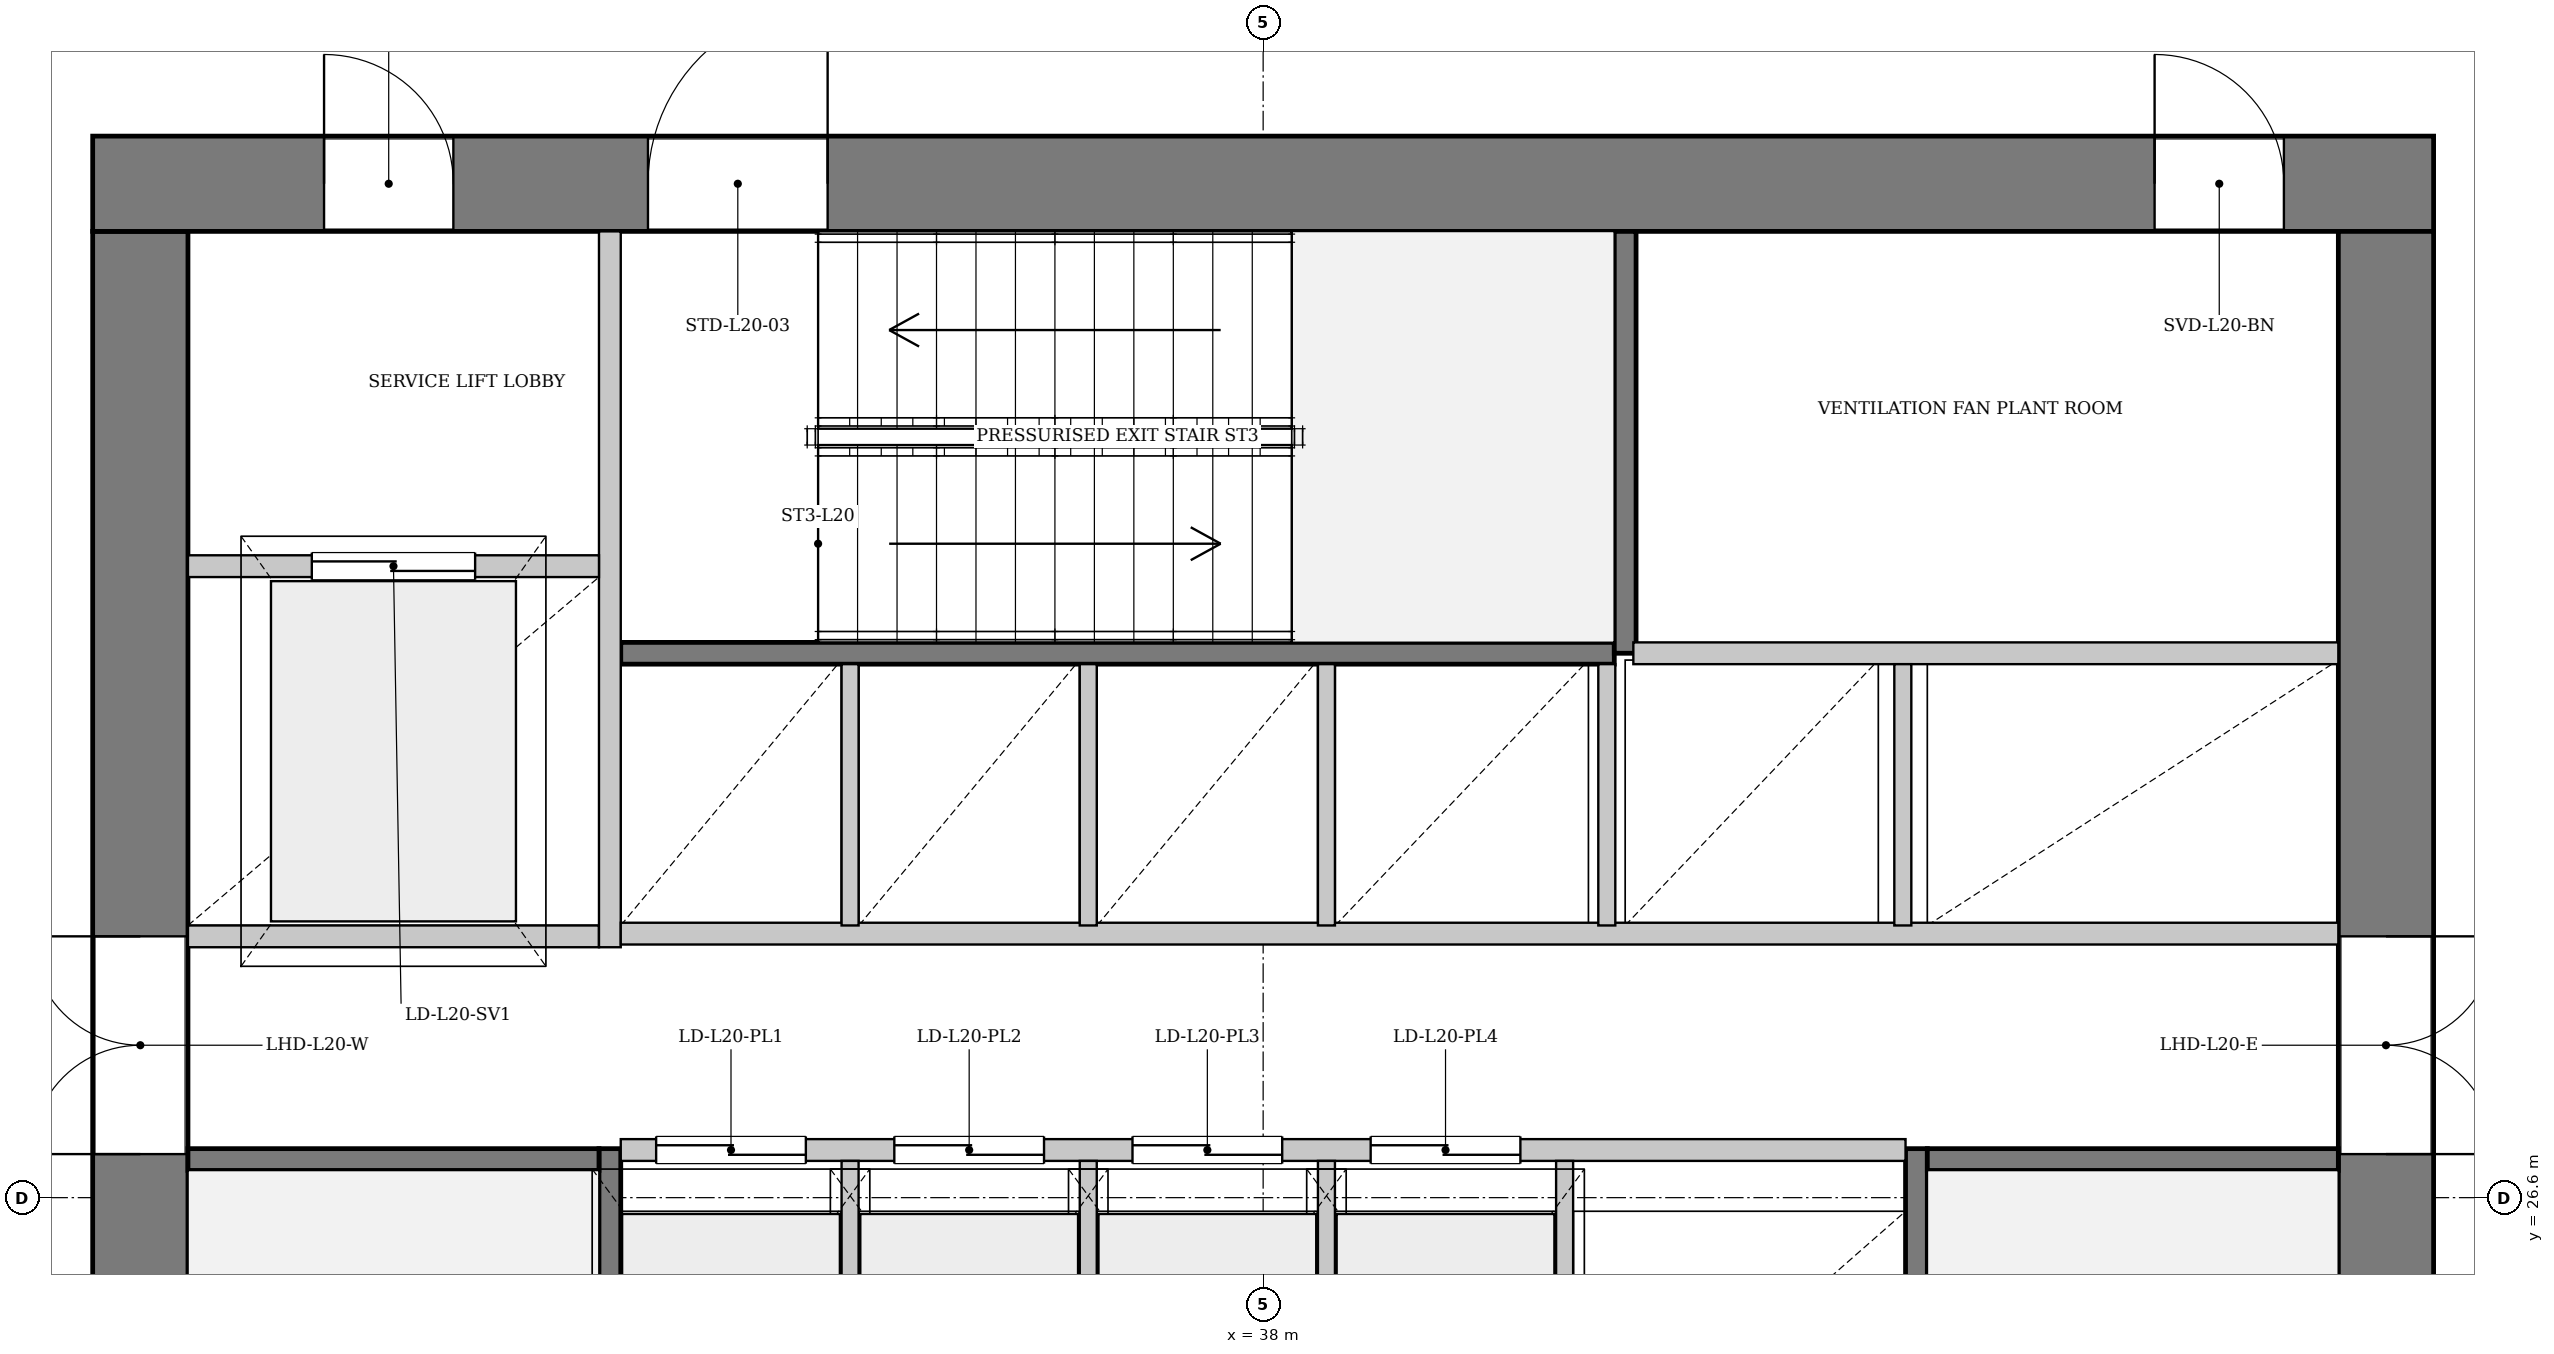
"""IFC4 building model, lengths in metres.
Left out: names, types, materials, properties, quantities, classifications, styles, units other than length and angle.
Written with IfcOpenShell. Run it as: python <this file> out.ifc"""

import sys

from ifc_helpers import new_model, si_unit, direction, frame, frame_2d, origin, place, context, subcontext, project, spatial, rectangle, extrude, source, transform, mapped, element, fill, save


model = new_model("IFC4")
c1 = context("Model", 3, precision=1e-05, world=origin(), true_north=direction((0.0, 1.0)))
c2 = subcontext(c1, "Body", "Model", "MODEL_VIEW")
j1 = project(units=[si_unit("LENGTHUNIT", "METRE"), si_unit("PLANEANGLEUNIT", "RADIAN")], contexts=[c1])
p1 = place(None, origin())
s1 = spatial("IfcSite", under=j1, at=p1, CompositionType="ELEMENT")
p2 = place(p1, origin())
s2 = spatial("IfcBuilding", under=s1, at=p2, CompositionType="ELEMENT")
p3 = place(p2, frame((0.0, 0.0, 79.9)))
s3 = spatial("IfcBuildingStorey", under=s2, at=p3, CompositionType="ELEMENT", Elevation=79.9)
p4 = place(p3, frame((45.57, 43.679, 0.0), z_axis=(0.0, 0.0, 1.0), x_axis=(0.920635630861, -0.390422892758, 0.0)))
e1 = element("IfcWall", 1, at=p4, inside=s3, PredefinedType="SOLIDWALL", context=c2, shape_type="SweptSolid", body=[
    extrude(rectangle(XDim=23.607, YDim=0.38, at=frame_2d((11.804, 0.0))), origin(), (0.0, 0.0, 1.0), 3.642),
])
p5 = place(p3, frame((29.75, 19.5, 0.0), z_axis=(0.0, 0.0, 1.0), x_axis=(0.0, 1.0, 0.0)))
e2 = element("IfcWall", 2, at=p5, inside=s3, PredefinedType="SHEAR", context=c2, shape_type="SweptSolid", body=[
    extrude(rectangle(XDim=14.2, YDim=0.7, at=frame_2d((7.1, 0.0))), origin(), (0.0, 0.0, 1.0), 4.25),
])
p6 = place(p5, frame((7.42, 0.0, 0.0)))
e3 = element("IfcOpeningElement", 3, at=p6, cuts=e2, PredefinedType="OPENING", context=c2, shape_type="SweptSolid", body=[
    extrude(rectangle(XDim=1.6, YDim=2.2, at=frame_2d((0.8, 1.1))), frame((0.0, 0.36, 0.0), z_axis=(0.0, -1.0, 0.0), x_axis=(1.0, 0.0, 0.0)), (0.0, 0.0, 1.0), 0.72),
])
p7 = place(p3, frame((29.4, 34.05, 0.0), z_axis=(0.0, 0.0, 1.0), x_axis=(1.0, 0.0, 0.0)))
e4 = element("IfcWall", 4, at=p7, inside=s3, PredefinedType="SHEAR", context=c2, shape_type="SweptSolid", body=[
    extrude(rectangle(XDim=17.2, YDim=0.7, at=frame_2d((8.6, 0.0))), origin(), (0.0, 0.0, 1.0), 4.25),
])
p8 = place(p7, frame((1.7, 0.0, 0.0)))
e5 = element("IfcOpeningElement", 5, at=p8, cuts=e4, PredefinedType="OPENING", context=c2, shape_type="SweptSolid", body=[
    extrude(rectangle(XDim=0.95, YDim=2.1, at=frame_2d((0.475, 1.05))), frame((0.0, 0.36, 0.0), z_axis=(0.0, -1.0, 0.0), x_axis=(1.0, 0.0, 0.0)), (0.0, 0.0, 1.0), 0.72),
])
p9 = place(p7, frame((4.08, 0.0, 0.0)))
e6 = element("IfcOpeningElement", 6, at=p9, cuts=e4, PredefinedType="OPENING", context=c2, shape_type="SweptSolid", body=[
    extrude(rectangle(XDim=1.32, YDim=2.2, at=frame_2d((0.66, 1.1))), frame((0.0, 0.36, 0.0), z_axis=(0.0, -1.0, 0.0), x_axis=(1.0, 0.0, 0.0)), (0.0, 0.0, 1.0), 0.72),
])
p10 = place(p7, frame((15.15, 0.0, 0.0)))
e7 = element("IfcOpeningElement", 7, at=p10, cuts=e4, PredefinedType="OPENING", context=c2, shape_type="SweptSolid", body=[
    extrude(rectangle(XDim=0.95, YDim=2.1, at=frame_2d((0.475, 1.05))), frame((0.0, 0.36, 0.0), z_axis=(0.0, -1.0, 0.0), x_axis=(1.0, 0.0, 0.0)), (0.0, 0.0, 1.0), 0.72),
])
p11 = place(p3, frame((46.25, 33.7, 0.0), z_axis=(0.0, 0.0, 1.0), x_axis=(0.0, -1.0, 0.0)))
e8 = element("IfcWall", 8, at=p11, inside=s3, PredefinedType="SHEAR", context=c2, shape_type="SweptSolid", body=[
    extrude(rectangle(XDim=14.2, YDim=0.7, at=frame_2d((7.1, 0.0))), origin(), (0.0, 0.0, 1.0), 4.25),
])
p12 = place(p11, frame((5.18, 0.0, 0.0)))
e9 = element("IfcOpeningElement", 9, at=p12, cuts=e8, PredefinedType="OPENING", context=c2, shape_type="SweptSolid", body=[
    extrude(rectangle(XDim=1.6, YDim=2.2, at=frame_2d((0.8, 1.1))), frame((0.0, 0.36, 0.0), z_axis=(0.0, -1.0, 0.0), x_axis=(1.0, 0.0, 0.0)), (0.0, 0.0, 1.0), 0.72),
])
p13 = place(p3, frame((33.2, 19.5, 0.0), z_axis=(0.0, 0.0, 1.0), x_axis=(0.0, 1.0, 0.0)))
e10 = element("IfcWall", 10, at=p13, inside=s3, PredefinedType="PARTITIONING", context=c2, shape_type="SweptSolid", body=[
    extrude(rectangle(XDim=7.46, YDim=0.16, at=frame_2d((3.73, 0.0))), origin(), (0.0, 0.0, 1.0), 4.25),
])
p14 = place(p13, frame((0.08, 0.0, 0.0)))
e11 = element("IfcOpeningElement", 11, at=p14, cuts=e10, PredefinedType="OPENING", context=c2, shape_type="SweptSolid", body=[
    extrude(rectangle(XDim=1.32, YDim=2.2, at=frame_2d((0.66, 1.1))), frame((0.0, 0.09, 0.0), z_axis=(0.0, -1.0, 0.0), x_axis=(1.0, 0.0, 0.0)), (0.0, 0.0, 1.0), 0.18),
])
p15 = place(p3, frame((30.1, 26.88, 0.0), z_axis=(0.0, 0.0, 1.0), x_axis=(1.0, 0.0, 0.0)))
e12 = element("IfcWall", 12, at=p15, inside=s3, PredefinedType="PARTITIONING", context=c2, shape_type="SweptSolid", body=[
    extrude(rectangle(XDim=3.02, YDim=0.16, at=frame_2d((1.51, 0.0))), origin(), (0.0, 0.0, 1.0), 4.25),
])
p16 = place(p3, frame((42.8, 26.96, 0.0), z_axis=(0.0, 0.0, 1.0), x_axis=(0.0, -1.0, 0.0)))
e13 = element("IfcWall", 13, at=p16, inside=s3, PredefinedType="PARTITIONING", context=c2, shape_type="SweptSolid", body=[
    extrude(rectangle(XDim=7.46, YDim=0.16, at=frame_2d((3.73, 0.0))), origin(), (0.0, 0.0, 1.0), 4.25),
])
p17 = place(p16, frame((6.06, 0.0, 0.0)))
e14 = element("IfcOpeningElement", 14, at=p17, cuts=e13, PredefinedType="OPENING", context=c2, shape_type="SweptSolid", body=[
    extrude(rectangle(XDim=1.32, YDim=2.2, at=frame_2d((0.66, 1.1))), frame((0.0, 0.09, 0.0), z_axis=(0.0, -1.0, 0.0), x_axis=(1.0, 0.0, 0.0)), (0.0, 0.0, 1.0), 0.18),
])
p18 = place(p3, frame((42.88, 26.88, 0.0), z_axis=(0.0, 0.0, 1.0), x_axis=(1.0, 0.0, 0.0)))
e15 = element("IfcWall", 15, at=p18, inside=s3, PredefinedType="PARTITIONING", context=c2, shape_type="SweptSolid", body=[
    extrude(rectangle(XDim=3.02, YDim=0.16, at=frame_2d((1.51, 0.0))), origin(), (0.0, 0.0, 1.0), 4.25),
])
p19 = place(p3, frame((33.28, 30.6, 0.0), z_axis=(0.0, 0.0, 1.0), x_axis=(1.0, 0.0, 0.0)))
e16 = element("IfcWall", 16, at=p19, inside=s3, PredefinedType="PARTITIONING", context=c2, shape_type="SweptSolid", body=[
    extrude(rectangle(XDim=7.3, YDim=0.16, at=frame_2d((3.65, 0.0))), origin(), (0.0, 0.0, 1.0), 4.25),
])
p20 = place(p3, frame((40.66, 30.6, 0.0), z_axis=(0.0, 0.0, 1.0), x_axis=(0.0, 1.0, 0.0)))
e17 = element("IfcWall", 17, at=p20, inside=s3, PredefinedType="PARTITIONING", context=c2, shape_type="SweptSolid", body=[
    extrude(rectangle(XDim=3.1, YDim=0.16, at=frame_2d((1.55, 0.0))), origin(), (0.0, 0.0, 1.0), 4.25),
])
p21 = place(p3, frame((30.1, 28.52, 0.0), z_axis=(0.0, 0.0, 1.0), x_axis=(1.0, 0.0, 0.0)))
e18 = element("IfcWall", 18, at=p21, inside=s3, PredefinedType="PARTITIONING", context=c2, shape_type="SweptSolid", body=[
    extrude(rectangle(XDim=3.02, YDim=0.16, at=frame_2d((1.51, 0.0))), origin(), (0.0, 0.0, 1.0), 4.25),
])
p22 = place(p3, frame((33.2, 28.44, 0.0), z_axis=(0.0, 0.0, 1.0), x_axis=(0.0, 1.0, 0.0)))
e19 = element("IfcWall", 19, at=p22, inside=s3, PredefinedType="PARTITIONING", context=c2, shape_type="SweptSolid", body=[
    extrude(rectangle(XDim=5.26, YDim=0.16, at=frame_2d((2.63, 0.0))), origin(), (0.0, 0.0, 1.0), 4.25),
])
p23 = place(p3, frame((30.1, 31.24, 0.0), z_axis=(0.0, 0.0, 1.0), x_axis=(1.0, 0.0, 0.0)))
e20 = element("IfcWall", 20, at=p23, inside=s3, PredefinedType="PARTITIONING", context=c2, shape_type="SweptSolid", body=[
    extrude(rectangle(XDim=3.02, YDim=0.16, at=frame_2d((1.51, 0.0))), origin(), (0.0, 0.0, 1.0), 4.25),
])
p24 = place(p23, frame((0.91, 0.0, 0.0)))
e21 = element("IfcOpeningElement", 21, at=p24, cuts=e20, PredefinedType="OPENING", context=c2, shape_type="SweptSolid", body=[
    extrude(rectangle(XDim=1.2, YDim=2.2, at=frame_2d((0.6, 1.1))), frame((0.0, 0.09, 0.0), z_axis=(0.0, -1.0, 0.0), x_axis=(1.0, 0.0, 0.0)), (0.0, 0.0, 1.0), 0.18),
])
p25 = place(p3, frame((33.28, 26.95, 0.0), z_axis=(0.0, 0.0, 1.0), x_axis=(1.0, 0.0, 0.0)))
e22 = element("IfcWall", 22, at=p25, inside=s3, PredefinedType="PARTITIONING", context=c2, shape_type="SweptSolid", body=[
    extrude(rectangle(XDim=9.44, YDim=0.16, at=frame_2d((4.72, 0.0))), origin(), (0.0, 0.0, 1.0), 4.25),
])
p26 = place(p25, frame((0.26, 0.0, 0.0)))
e23 = element("IfcOpeningElement", 23, at=p26, cuts=e22, PredefinedType="OPENING", context=c2, shape_type="SweptSolid", body=[
    extrude(rectangle(XDim=1.1, YDim=2.2, at=frame_2d((0.55, 1.1))), frame((0.0, 0.09, 0.0), z_axis=(0.0, -1.0, 0.0), x_axis=(1.0, 0.0, 0.0)), (0.0, 0.0, 1.0), 0.18),
])
p27 = place(p25, frame((2.01, 0.0, 0.0)))
e24 = element("IfcOpeningElement", 24, at=p27, cuts=e22, PredefinedType="OPENING", context=c2, shape_type="SweptSolid", body=[
    extrude(rectangle(XDim=1.1, YDim=2.2, at=frame_2d((0.55, 1.1))), frame((0.0, 0.09, 0.0), z_axis=(0.0, -1.0, 0.0), x_axis=(1.0, 0.0, 0.0)), (0.0, 0.0, 1.0), 0.18),
])
p28 = place(p25, frame((3.76, 0.0, 0.0)))
e25 = element("IfcOpeningElement", 25, at=p28, cuts=e22, PredefinedType="OPENING", context=c2, shape_type="SweptSolid", body=[
    extrude(rectangle(XDim=1.1, YDim=2.2, at=frame_2d((0.55, 1.1))), frame((0.0, 0.09, 0.0), z_axis=(0.0, -1.0, 0.0), x_axis=(1.0, 0.0, 0.0)), (0.0, 0.0, 1.0), 0.18),
])
p29 = place(p25, frame((5.51, 0.0, 0.0)))
e26 = element("IfcOpeningElement", 26, at=p29, cuts=e22, PredefinedType="OPENING", context=c2, shape_type="SweptSolid", body=[
    extrude(rectangle(XDim=1.1, YDim=2.2, at=frame_2d((0.55, 1.1))), frame((0.0, 0.09, 0.0), z_axis=(0.0, -1.0, 0.0), x_axis=(1.0, 0.0, 0.0)), (0.0, 0.0, 1.0), 0.18),
])
for number, where, z_axis, x_axis in (
    (27, (34.965, 24.56, 0.0), (0.0, 0.0, 1.0), (0.0, 1.0, 0.0)),
    (28, (36.715, 24.56, 0.0), (0.0, 0.0, 1.0), (0.0, 1.0, 0.0)),
    (29, (38.465, 24.56, 0.0), (0.0, 0.0, 1.0), (0.0, 1.0, 0.0)),
    (30, (40.215, 24.56, 0.0), (0.0, 0.0, 1.0), (0.0, 1.0, 0.0)),
):
    element("IfcWall", number, at=place(p3, frame(where, z_axis=z_axis, x_axis=x_axis)), inside=s3, PredefinedType="PARTITIONING", context=c2, shape_type="SweptSolid", body=[
        extrude(rectangle(XDim=2.31, YDim=0.125, at=frame_2d((1.155, 0.0))), origin(), (0.0, 0.0, 1.0), 4.25),
    ])
p30 = place(p3, frame((33.28, 28.54, 0.0), z_axis=(0.0, 0.0, 1.0), x_axis=(1.0, 0.0, 0.0)))
e31 = element("IfcWall", 31, at=p30, inside=s3, PredefinedType="PARTITIONING", context=c2, shape_type="SweptSolid", body=[
    extrude(rectangle(XDim=12.62, YDim=0.16, at=frame_2d((6.31, 0.0))), origin(), (0.0, 0.0, 1.0), 4.25),
])
p31 = place(p3, frame((40.72, 30.6, 0.0), z_axis=(0.0, 0.0, 1.0), x_axis=(1.0, 0.0, 0.0)))
e32 = element("IfcWall", 32, at=p31, inside=s3, PredefinedType="PARTITIONING", context=c2, shape_type="SweptSolid", body=[
    extrude(rectangle(XDim=5.18, YDim=0.16, at=frame_2d((2.59, 0.0))), origin(), (0.0, 0.0, 1.0), 4.25),
])
for number, where, z_axis, x_axis in (
    (33, (34.965, 28.6, 0.0), (0.0, 0.0, 1.0), (0.0, 1.0, 0.0)),
    (34, (36.715, 28.6, 0.0), (0.0, 0.0, 1.0), (0.0, 1.0, 0.0)),
    (35, (38.465, 28.6, 0.0), (0.0, 0.0, 1.0), (0.0, 1.0, 0.0)),
    (36, (40.525, 28.6, 0.0), (0.0, 0.0, 1.0), (0.0, 1.0, 0.0)),
    (37, (42.7, 28.6, 0.0), (0.0, 0.0, 1.0), (0.0, 1.0, 0.0)),
):
    element("IfcWall", number, at=place(p3, frame(where, z_axis=z_axis, x_axis=x_axis)), inside=s3, PredefinedType="PARTITIONING", context=c2, shape_type="SweptSolid", body=[
        extrude(rectangle(XDim=1.92, YDim=0.125, at=frame_2d((0.96, 0.0))), origin(), (0.0, 0.0, 1.0), 4.25),
    ])
m1 = source(origin(), c2, "Body", "SweptSolid", [
    extrude(rectangle(XDim=1.6, YDim=2.2, at=frame_2d((0.8, 1.1))), frame((0.0, 0.025, 0.0), z_axis=(0.0, -1.0, 0.0), x_axis=(1.0, 0.0, 0.0)), (0.0, 0.0, 1.0), 0.05),
])
p32 = place(p6, origin())
e38 = element("IfcDoor", 38, at=p32, inside=s3, OperationType="DOUBLE_DOOR_SINGLE_SWING", PredefinedType="DOOR", context=c2, shape_type="MappedRepresentation", body=[
    mapped(m1, transform((0.0, 0.0, 0.0), x_axis=(1.0, 0.0, 0.0), y_axis=(0.0, 1.0, 0.0), z_axis=(0.0, 0.0, 1.0), scale=1.0)),
])
fill(e3, e38)
m2 = source(origin(), c2, "Body", "SweptSolid", [
    extrude(rectangle(XDim=0.95, YDim=2.1, at=frame_2d((0.475, 1.05))), frame((0.0, 0.025, 0.0), z_axis=(0.0, -1.0, 0.0), x_axis=(1.0, 0.0, 0.0)), (0.0, 0.0, 1.0), 0.05),
])
p33 = place(p8, origin())
e39 = element("IfcDoor", 39, at=p33, inside=s3, OperationType="SINGLE_SWING_LEFT", PredefinedType="DOOR", context=c2, shape_type="MappedRepresentation", body=[
    mapped(m2, transform((0.0, 0.0, 0.0), x_axis=(1.0, 0.0, 0.0), y_axis=(0.0, 1.0, 0.0), z_axis=(0.0, 0.0, 1.0), scale=1.0)),
])
fill(e5, e39)
m3 = source(origin(), c2, "Body", "SweptSolid", [
    extrude(rectangle(XDim=1.32, YDim=2.2, at=frame_2d((0.66, 1.1))), frame((0.0, 0.025, 0.0), z_axis=(0.0, -1.0, 0.0), x_axis=(1.0, 0.0, 0.0)), (0.0, 0.0, 1.0), 0.05),
])
p34 = place(p9, origin())
e40 = element("IfcDoor", 40, at=p34, inside=s3, OperationType="SINGLE_SWING_RIGHT", PredefinedType="DOOR", context=c2, shape_type="MappedRepresentation", body=[
    mapped(m3, transform((0.0, 0.0, 0.0), x_axis=(1.0, 0.0, 0.0), y_axis=(0.0, 1.0, 0.0), z_axis=(0.0, 0.0, 1.0), scale=1.0)),
])
fill(e6, e40)
p35 = place(p12, origin())
e41 = element("IfcDoor", 41, at=p35, inside=s3, OperationType="DOUBLE_DOOR_SINGLE_SWING", PredefinedType="DOOR", context=c2, shape_type="MappedRepresentation", body=[
    mapped(m1, transform((0.0, 0.0, 0.0), x_axis=(1.0, 0.0, 0.0), y_axis=(0.0, 1.0, 0.0), z_axis=(0.0, 0.0, 1.0), scale=1.0)),
])
fill(e9, e41)
m4 = source(origin(), c2, "Body", "SweptSolid", [
    extrude(rectangle(XDim=1.2, YDim=2.2, at=frame_2d((0.6, 1.1))), frame((0.0, 0.025, 0.0), z_axis=(0.0, -1.0, 0.0), x_axis=(1.0, 0.0, 0.0)), (0.0, 0.0, 1.0), 0.05),
])
p36 = place(p24, origin())
e42 = element("IfcDoor", 42, at=p36, inside=s3, OperationType="DOUBLE_DOOR_SLIDING", PredefinedType="DOOR", context=c2, shape_type="MappedRepresentation", body=[
    mapped(m4, transform((0.0, 0.0, 0.0), x_axis=(1.0, 0.0, 0.0), y_axis=(0.0, 1.0, 0.0), z_axis=(0.0, 0.0, 1.0), scale=1.0)),
])
fill(e21, e42)
m5 = source(origin(), c2, "Body", "SweptSolid", [
    extrude(rectangle(XDim=1.1, YDim=2.2, at=frame_2d((0.55, 1.1))), frame((0.0, 0.025, 0.0), z_axis=(0.0, -1.0, 0.0), x_axis=(1.0, 0.0, 0.0)), (0.0, 0.0, 1.0), 0.05),
])
p37 = place(p26, origin())
e43 = element("IfcDoor", 43, at=p37, inside=s3, OperationType="DOUBLE_DOOR_SLIDING", PredefinedType="DOOR", context=c2, shape_type="MappedRepresentation", body=[
    mapped(m5, transform((0.0, 0.0, 0.0), x_axis=(1.0, 0.0, 0.0), y_axis=(0.0, 1.0, 0.0), z_axis=(0.0, 0.0, 1.0), scale=1.0)),
])
fill(e23, e43)
p38 = place(p27, origin())
e44 = element("IfcDoor", 44, at=p38, inside=s3, OperationType="DOUBLE_DOOR_SLIDING", PredefinedType="DOOR", context=c2, shape_type="MappedRepresentation", body=[
    mapped(m5, transform((0.0, 0.0, 0.0), x_axis=(1.0, 0.0, 0.0), y_axis=(0.0, 1.0, 0.0), z_axis=(0.0, 0.0, 1.0), scale=1.0)),
])
fill(e24, e44)
p39 = place(p28, origin())
e45 = element("IfcDoor", 45, at=p39, inside=s3, OperationType="DOUBLE_DOOR_SLIDING", PredefinedType="DOOR", context=c2, shape_type="MappedRepresentation", body=[
    mapped(m5, transform((0.0, 0.0, 0.0), x_axis=(1.0, 0.0, 0.0), y_axis=(0.0, 1.0, 0.0), z_axis=(0.0, 0.0, 1.0), scale=1.0)),
])
fill(e25, e45)
p40 = place(p29, origin())
e46 = element("IfcDoor", 46, at=p40, inside=s3, OperationType="DOUBLE_DOOR_SLIDING", PredefinedType="DOOR", context=c2, shape_type="MappedRepresentation", body=[
    mapped(m5, transform((0.0, 0.0, 0.0), x_axis=(1.0, 0.0, 0.0), y_axis=(0.0, 1.0, 0.0), z_axis=(0.0, 0.0, 1.0), scale=1.0)),
])
fill(e26, e46)
p41 = place(p10, origin())
e47 = element("IfcDoor", 47, at=p41, inside=s3, OperationType="SINGLE_SWING_LEFT", PredefinedType="DOOR", context=c2, shape_type="MappedRepresentation", body=[
    mapped(m2, transform((0.0, 0.0, 0.0), x_axis=(1.0, 0.0, 0.0), y_axis=(0.0, 1.0, 0.0), z_axis=(0.0, 0.0, 1.0), scale=1.0)),
])
fill(e7, e47)
save(model, sys.argv[1])
